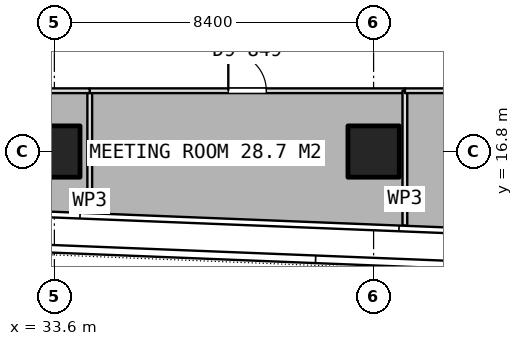
"""IFC4 building model, lengths in metres.
Left out: names, types, materials, properties, quantities, classifications, styles, units other than length and angle.
Written with IfcOpenShell. Run it as: python <this file> out.ifc"""

import sys

from ifc_helpers import new_model, si_unit, direction, frame, frame_2d, origin, origin_2d, place, context, subcontext, project, spatial, rectangle, extrude, element, fill, save


model = new_model("IFC4")
c1 = context("Model", 3, precision=1e-05, world=origin(), true_north=direction((0.0, 1.0)))
c2 = subcontext(c1, "Body", "Model", "MODEL_VIEW")
j1 = project(units=[si_unit("LENGTHUNIT", "METRE"), si_unit("PLANEANGLEUNIT", "RADIAN")], contexts=[c1])
p1 = place(None, origin())
s1 = spatial("IfcSite", under=j1, at=p1, CompositionType="ELEMENT")
p2 = place(p1, origin())
s2 = spatial("IfcBuilding", under=s1, at=p2, CompositionType="ELEMENT")
p3 = place(p2, frame((0.0, 0.0, 210.2)))
s3 = spatial("IfcBuildingStorey", under=s2, at=p3, CompositionType="ELEMENT", Elevation=210.2)
for number, where, z_axis, x_axis in (
    (1, (33.6, 16.8, 0.0), (0.0, 0.0, 1.0), (1.0, 0.0, 0.0)),
    (2, (42.0, 16.8, 0.0), (0.0, 0.0, 1.0), (1.0, 0.0, 0.0)),
):
    element("IfcColumn", number, at=place(p3, frame(where, z_axis=z_axis, x_axis=x_axis)), inside=s3, PredefinedType="COLUMN", context=c2, shape_type="SweptSolid", body=[
        extrude(rectangle(XDim=1.35, YDim=1.35, at=origin_2d()), origin(), (0.0, 0.0, 1.0), 3.75),
    ])
p4 = place(p3, frame((34.531, 15.182, 0.0), z_axis=(0.0, 0.0, 1.0), x_axis=(0.0, 1.0, 0.0)))
e3 = element("IfcWall", 3, at=p4, inside=s3, PredefinedType="PARTITIONING", context=c2, shape_type="SweptSolid", body=[
    extrude(rectangle(XDim=3.218, YDim=0.125, at=frame_2d((1.609, 0.0))), origin(), (0.0, 0.0, 1.0), 3.5),
])
p5 = place(p3, frame((34.531, 18.4, 0.0), z_axis=(0.0, 0.0, 1.0), x_axis=(1.0, 0.0, 0.0)))
e4 = element("IfcWall", 4, at=p5, inside=s3, PredefinedType="PARTITIONING", context=c2, shape_type="SweptSolid", body=[
    extrude(rectangle(XDim=8.292, YDim=0.125, at=frame_2d((4.146, 0.0))), origin(), (0.0, 0.0, 1.0), 3.5),
])
p6 = place(p5, frame((3.646, 0.0, 0.0)))
e5 = element("IfcOpeningElement", 5, at=p6, cuts=e4, PredefinedType="OPENING", context=c2, shape_type="SweptSolid", body=[
    extrude(rectangle(XDim=1.0, YDim=2.1, at=frame_2d((0.5, 1.05))), frame((0.0, 0.073, 0.0), z_axis=(0.0, -1.0, 0.0), x_axis=(1.0, 0.0, 0.0)), (0.0, 0.0, 1.0), 0.145),
])
p7 = place(p3, frame((42.823, 18.4, 0.0), z_axis=(0.0, 0.0, 1.0), x_axis=(0.0, -1.0, 0.0)))
e6 = element("IfcWall", 6, at=p7, inside=s3, PredefinedType="PARTITIONING", context=c2, shape_type="SweptSolid", body=[
    extrude(rectangle(XDim=3.549, YDim=0.125, at=frame_2d((1.774, 0.0))), origin(), (0.0, 0.0, 1.0), 3.5),
])
p8 = place(p3, frame((42.824, 18.4, 0.0), z_axis=(0.0, 0.0, 1.0), x_axis=(1.0, 0.0, 0.0)))
e7 = element("IfcWall", 7, at=p8, inside=s3, PredefinedType="PARTITIONING", context=c2, shape_type="SweptSolid", body=[
    extrude(rectangle(XDim=8.466, YDim=0.125, at=frame_2d((4.233, 0.0))), origin(), (0.0, 0.0, 1.0), 3.5),
])
p9 = place(p8, frame((3.733, 0.0, 0.0)))
e8 = element("IfcOpeningElement", 8, at=p9, cuts=e7, PredefinedType="OPENING", context=c2, shape_type="SweptSolid", body=[
    extrude(rectangle(XDim=1.0, YDim=2.1, at=frame_2d((0.5, 1.05))), frame((0.0, 0.073, 0.0), z_axis=(0.0, -1.0, 0.0), x_axis=(1.0, 0.0, 0.0)), (0.0, 0.0, 1.0), 0.145),
])
p10 = place(p3, frame((26.058, 18.4, 0.0), z_axis=(0.0, 0.0, 1.0), x_axis=(1.0, 0.0, 0.0)))
e9 = element("IfcWall", 9, at=p10, inside=s3, PredefinedType="PARTITIONING", context=c2, shape_type="SweptSolid", body=[
    extrude(rectangle(XDim=8.472, YDim=0.125, at=frame_2d((4.236, 0.0))), origin(), (0.0, 0.0, 1.0), 3.5),
])
p11 = place(p10, frame((3.736, 0.0, 0.0)))
e10 = element("IfcOpeningElement", 10, at=p11, cuts=e9, PredefinedType="OPENING", context=c2, shape_type="SweptSolid", body=[
    extrude(rectangle(XDim=1.0, YDim=2.1, at=frame_2d((0.5, 1.05))), frame((0.0, 0.073, 0.0), z_axis=(0.0, -1.0, 0.0), x_axis=(1.0, 0.0, 0.0)), (0.0, 0.0, 1.0), 0.145),
])
p12 = place(p6, origin())
e11 = element("IfcDoor", 11, at=p12, inside=s3, OperationType="SINGLE_SWING_LEFT", PredefinedType="DOOR", context=c2, shape_type="SweptSolid", body=[
    extrude(rectangle(XDim=1.0, YDim=2.1, at=frame_2d((0.5, 1.05))), frame((0.0, 0.025, 0.0), z_axis=(0.0, -1.0, 0.0), x_axis=(1.0, 0.0, 0.0)), (0.0, 0.0, 1.0), 0.05),
])
fill(e5, e11)
save(model, sys.argv[1])
